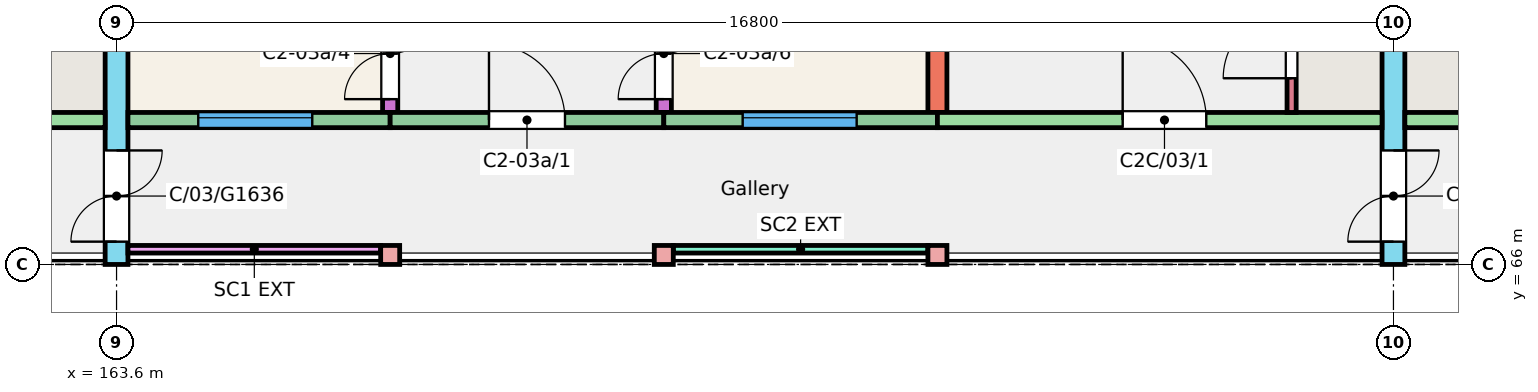
"""IFC4 building model, lengths in metres.
Left out: names, types, materials, properties, quantities, classifications, styles, units other than length and angle.
Written with IfcOpenShell. Run it as: python <this file> out.ifc"""

import sys

from ifc_helpers import new_model, si_unit, direction, frame, frame_2d, origin, origin_2d, place, context, subcontext, project, spatial, rectangle, extrude, element, fill, save


model = new_model("IFC4")
c1 = context("Model", 3, precision=1e-05, world=origin(), true_north=direction((0.0, 1.0)))
c2 = subcontext(c1, "Body", "Model", "MODEL_VIEW")
j1 = project(units=[si_unit("LENGTHUNIT", "METRE"), si_unit("PLANEANGLEUNIT", "RADIAN")], contexts=[c1])
p1 = place(None, origin())
s1 = spatial("IfcSite", under=j1, at=p1, CompositionType="ELEMENT")
p2 = place(p1, origin())
s2 = spatial("IfcBuilding", under=s1, at=p2, CompositionType="ELEMENT")
p3 = place(p2, frame((0.0, 0.0, 9.0)))
s3 = spatial("IfcBuildingStorey", under=s2, at=p3, CompositionType="ELEMENT", Elevation=9.0)
p4 = place(p3, frame((163.6, 66.0, 0.0), z_axis=(0.0, 0.0, 1.0), x_axis=(0.0, 1.0, 0.0)))
e1 = element("IfcWall", 1, at=p4, inside=s3, PredefinedType="SHEAR", context=c2, shape_type="SweptSolid", body=[
    extrude(rectangle(XDim=11.0, YDim=0.3, at=frame_2d((5.5, 0.0))), origin(), (0.0, 0.0, 1.0), 3.0),
])
p5 = place(p4, frame((0.3, 0.0, 0.0)))
e2 = element("IfcOpeningElement", 2, at=p5, cuts=e1, PredefinedType="OPENING", context=c2, shape_type="SweptSolid", body=[
    extrude(rectangle(XDim=1.2, YDim=2.1, at=frame_2d((0.6, 1.05))), frame((0.0, 0.16, 0.0), z_axis=(0.0, -1.0, 0.0), x_axis=(1.0, 0.0, 0.0)), (0.0, 0.0, 1.0), 0.32),
])
p6 = place(p3, frame((167.2, 68.0, 0.0), z_axis=(0.0, 0.0, 1.0), x_axis=(0.0, 1.0, 0.0)))
e3 = element("IfcWall", 3, at=p6, inside=s3, PredefinedType="SHEAR", context=c2, shape_type="SweptSolid", body=[
    extrude(rectangle(XDim=9.0, YDim=0.2, at=frame_2d((4.5, 0.0))), origin(), (0.0, 0.0, 1.0), 3.0),
])
p7 = place(p6, frame((0.175, 0.0, 0.0)))
e4 = element("IfcOpeningElement", 4, at=p7, cuts=e3, PredefinedType="OPENING", context=c2, shape_type="SweptSolid", body=[
    extrude(rectangle(XDim=1.2, YDim=2.1, at=frame_2d((0.6, 1.05))), frame((0.0, 0.11, 0.0), z_axis=(0.0, -1.0, 0.0), x_axis=(1.0, 0.0, 0.0)), (0.0, 0.0, 1.0), 0.22),
])
p8 = place(p6, frame((6.4, 0.0, 0.0)))
e5 = element("IfcOpeningElement", 5, at=p8, cuts=e3, PredefinedType="OPENING", context=c2, shape_type="SweptSolid", body=[
    extrude(rectangle(XDim=1.2, YDim=2.1, at=frame_2d((0.6, 1.05))), frame((0.0, 0.11, 0.0), z_axis=(0.0, -1.0, 0.0), x_axis=(1.0, 0.0, 0.0)), (0.0, 0.0, 1.0), 0.22),
])
p9 = place(p3, frame((170.8, 68.0, 0.0), z_axis=(0.0, 0.0, 1.0), x_axis=(0.0, 1.0, 0.0)))
e6 = element("IfcWall", 6, at=p9, inside=s3, PredefinedType="SHEAR", context=c2, shape_type="SweptSolid", body=[
    extrude(rectangle(XDim=9.0, YDim=0.2, at=frame_2d((4.5, 0.0))), origin(), (0.0, 0.0, 1.0), 3.0),
])
p10 = place(p9, frame((0.175, 0.0, 0.0)))
e7 = element("IfcOpeningElement", 7, at=p10, cuts=e6, PredefinedType="OPENING", context=c2, shape_type="SweptSolid", body=[
    extrude(rectangle(XDim=1.2, YDim=2.1, at=frame_2d((0.6, 1.05))), frame((0.0, 0.11, 0.0), z_axis=(0.0, -1.0, 0.0), x_axis=(1.0, 0.0, 0.0)), (0.0, 0.0, 1.0), 0.22),
])
p11 = place(p9, frame((6.4, 0.0, 0.0)))
e8 = element("IfcOpeningElement", 8, at=p11, cuts=e6, PredefinedType="OPENING", context=c2, shape_type="SweptSolid", body=[
    extrude(rectangle(XDim=1.2, YDim=2.1, at=frame_2d((0.6, 1.05))), frame((0.0, 0.11, 0.0), z_axis=(0.0, -1.0, 0.0), x_axis=(1.0, 0.0, 0.0)), (0.0, 0.0, 1.0), 0.22),
])
p12 = place(p3, frame((174.4, 68.0, 0.0), z_axis=(0.0, 0.0, 1.0), x_axis=(0.0, 1.0, 0.0)))
e9 = element("IfcWall", 9, at=p12, inside=s3, PredefinedType="SHEAR", context=c2, shape_type="SweptSolid", body=[
    extrude(rectangle(XDim=9.0, YDim=0.25, at=frame_2d((4.5, 0.0))), origin(), (0.0, 0.0, 1.0), 3.0),
])
p13 = place(p3, frame((180.4, 66.0, 0.0), z_axis=(0.0, 0.0, 1.0), x_axis=(0.0, 1.0, 0.0)))
e10 = element("IfcWall", 10, at=p13, inside=s3, PredefinedType="SHEAR", context=c2, shape_type="SweptSolid", body=[
    extrude(rectangle(XDim=11.0, YDim=0.3, at=frame_2d((5.5, 0.0))), origin(), (0.0, 0.0, 1.0), 3.0),
])
p14 = place(p13, frame((0.3, 0.0, 0.0)))
e11 = element("IfcOpeningElement", 11, at=p14, cuts=e10, PredefinedType="OPENING", context=c2, shape_type="SweptSolid", body=[
    extrude(rectangle(XDim=1.2, YDim=2.1, at=frame_2d((0.6, 1.05))), frame((0.0, 0.16, 0.0), z_axis=(0.0, -1.0, 0.0), x_axis=(1.0, 0.0, 0.0)), (0.0, 0.0, 1.0), 0.32),
])
p15 = place(p3, frame((157.6, 67.9, 0.0), z_axis=(0.0, 0.0, 1.0), x_axis=(1.0, 0.0, 0.0)))
e12 = element("IfcWall", 12, at=p15, inside=s3, PredefinedType="SHEAR", context=c2, shape_type="SweptSolid", body=[
    extrude(rectangle(XDim=5.85, YDim=0.2, at=frame_2d((2.925, 0.0))), origin(), (0.0, 0.0, 1.0), 3.0),
])
p16 = place(p15, frame((2.438, 0.0, 0.0)))
e13 = element("IfcOpeningElement", 13, at=p16, cuts=e12, PredefinedType="OPENING", context=c2, shape_type="SweptSolid", body=[
    extrude(rectangle(XDim=1.1, YDim=2.1, at=frame_2d((0.55, 1.05))), frame((0.0, 0.11, 0.0), z_axis=(0.0, -1.0, 0.0), x_axis=(1.0, 0.0, 0.0)), (0.0, 0.0, 1.0), 0.22),
])
p17 = place(p3, frame((163.75, 67.9, 0.0), z_axis=(0.0, 0.0, 1.0), x_axis=(1.0, 0.0, 0.0)))
e14 = element("IfcWall", 14, at=p17, inside=s3, PredefinedType="SOLIDWALL", context=c2, shape_type="SweptSolid", body=[
    extrude(rectangle(XDim=3.45, YDim=0.2, at=frame_2d((1.725, 0.0))), origin(), (0.0, 0.0, 1.0), 3.0),
])
p18 = place(p17, frame((0.925, 0.0, 0.9)))
e15 = element("IfcOpeningElement", 15, at=p18, cuts=e14, PredefinedType="OPENING", context=c2, shape_type="SweptSolid", body=[
    extrude(rectangle(XDim=1.5, YDim=1.5, at=frame_2d((0.75, 0.75))), frame((0.0, 0.11, 0.0), z_axis=(0.0, -1.0, 0.0), x_axis=(1.0, 0.0, 0.0)), (0.0, 0.0, 1.0), 0.22),
])
p19 = place(p3, frame((167.2, 67.9, 0.0), z_axis=(0.0, 0.0, 1.0), x_axis=(1.0, 0.0, 0.0)))
e16 = element("IfcWall", 16, at=p19, inside=s3, PredefinedType="SOLIDWALL", context=c2, shape_type="SweptSolid", body=[
    extrude(rectangle(XDim=3.6, YDim=0.2, at=frame_2d((1.8, 0.0))), origin(), (0.0, 0.0, 1.0), 3.0),
])
p20 = place(p19, frame((1.3, 0.0, 0.0)))
e17 = element("IfcOpeningElement", 17, at=p20, cuts=e16, PredefinedType="OPENING", context=c2, shape_type="SweptSolid", body=[
    extrude(rectangle(XDim=1.0, YDim=2.1, at=frame_2d((0.5, 1.05))), frame((0.0, 0.11, 0.0), z_axis=(0.0, -1.0, 0.0), x_axis=(1.0, 0.0, 0.0)), (0.0, 0.0, 1.0), 0.22),
])
p21 = place(p3, frame((170.8, 67.9, 0.0), z_axis=(0.0, 0.0, 1.0), x_axis=(1.0, 0.0, 0.0)))
e18 = element("IfcWall", 18, at=p21, inside=s3, PredefinedType="SOLIDWALL", context=c2, shape_type="SweptSolid", body=[
    extrude(rectangle(XDim=3.6, YDim=0.2, at=frame_2d((1.8, 0.0))), origin(), (0.0, 0.0, 1.0), 3.0),
])
p22 = place(p21, frame((1.038, 0.0, 0.9)))
e19 = element("IfcOpeningElement", 19, at=p22, cuts=e18, PredefinedType="OPENING", context=c2, shape_type="SweptSolid", body=[
    extrude(rectangle(XDim=1.5, YDim=1.5, at=frame_2d((0.75, 0.75))), frame((0.0, 0.11, 0.0), z_axis=(0.0, -1.0, 0.0), x_axis=(1.0, 0.0, 0.0)), (0.0, 0.0, 1.0), 0.22),
])
p23 = place(p3, frame((174.4, 67.9, 0.0), z_axis=(0.0, 0.0, 1.0), x_axis=(1.0, 0.0, 0.0)))
e20 = element("IfcWall", 20, at=p23, inside=s3, PredefinedType="SHEAR", context=c2, shape_type="SweptSolid", body=[
    extrude(rectangle(XDim=5.85, YDim=0.2, at=frame_2d((2.925, 0.0))), origin(), (0.0, 0.0, 1.0), 3.0),
])
p24 = place(p23, frame((2.438, 0.0, 0.0)))
e21 = element("IfcOpeningElement", 21, at=p24, cuts=e20, PredefinedType="OPENING", context=c2, shape_type="SweptSolid", body=[
    extrude(rectangle(XDim=1.1, YDim=2.1, at=frame_2d((0.55, 1.05))), frame((0.0, 0.11, 0.0), z_axis=(0.0, -1.0, 0.0), x_axis=(1.0, 0.0, 0.0)), (0.0, 0.0, 1.0), 0.22),
])
p25 = place(p3, frame((179.06, 68.0, 0.0), z_axis=(0.0, 0.0, 1.0), x_axis=(0.0, 1.0, 0.0)))
e22 = element("IfcWall", 22, at=p25, inside=s3, PredefinedType="SHEAR", context=c2, shape_type="SweptSolid", body=[
    extrude(rectangle(XDim=1.72, YDim=0.12, at=frame_2d((0.86, 0.0))), origin(), (0.0, 0.0, 1.0), 3.0),
])
p26 = place(p25, frame((0.45, 0.0, 0.0)))
e23 = element("IfcOpeningElement", 23, at=p26, cuts=e22, PredefinedType="OPENING", context=c2, shape_type="SweptSolid", body=[
    extrude(rectangle(XDim=0.9, YDim=2.1, at=frame_2d((0.45, 1.05))), frame((0.0, 0.07, 0.0), z_axis=(0.0, -1.0, 0.0), x_axis=(1.0, 0.0, 0.0)), (0.0, 0.0, 1.0), 0.14),
])
p27 = place(p3, frame((180.55, 67.9, 0.0), z_axis=(0.0, 0.0, 1.0), x_axis=(1.0, 0.0, 0.0)))
e24 = element("IfcWall", 24, at=p27, inside=s3, PredefinedType="SHEAR", context=c2, shape_type="SweptSolid", body=[
    extrude(rectangle(XDim=5.85, YDim=0.2, at=frame_2d((2.925, 0.0))), origin(), (0.0, 0.0, 1.0), 3.0),
])
p28 = place(p27, frame((2.312, 0.0, 0.0)))
e25 = element("IfcOpeningElement", 25, at=p28, cuts=e24, PredefinedType="OPENING", context=c2, shape_type="SweptSolid", body=[
    extrude(rectangle(XDim=1.1, YDim=2.1, at=frame_2d((0.55, 1.05))), frame((0.0, 0.11, 0.0), z_axis=(0.0, -1.0, 0.0), x_axis=(1.0, 0.0, 0.0)), (0.0, 0.0, 1.0), 0.22),
])
for number, where, z_axis, x_axis in (
    (26, (167.2, 66.125, 0.0), (0.0, 0.0, 1.0), (1.0, 0.0, 0.0)),
    (27, (170.8, 66.125, 0.0), (0.0, 0.0, 1.0), (1.0, 0.0, 0.0)),
    (28, (174.4, 66.125, 0.0), (0.0, 0.0, 1.0), (1.0, 0.0, 0.0)),
):
    element("IfcColumn", number, at=place(p3, frame(where, z_axis=z_axis, x_axis=x_axis)), inside=s3, PredefinedType="COLUMN", context=c2, shape_type="SweptSolid", body=[
        extrude(rectangle(XDim=0.25, YDim=0.25, at=origin_2d()), origin(), (0.0, 0.0, 1.0), 3.0),
    ])
p29 = place(p3, frame((163.75, 66.2, 0.0), z_axis=(0.0, 0.0, 1.0), x_axis=(1.0, 0.0, 0.0)))
e29 = element("IfcWall", 29, at=p29, inside=s3, PredefinedType="SOLIDWALL", context=c2, shape_type="SweptSolid", body=[
    extrude(rectangle(XDim=3.325, YDim=0.1, at=frame_2d((1.663, 0.0))), origin(), (0.0, 0.0, 1.0), 2.45),
])
p30 = place(p3, frame((170.925, 66.2, 0.0), z_axis=(0.0, 0.0, 1.0), x_axis=(1.0, 0.0, 0.0)))
e30 = element("IfcWall", 30, at=p30, inside=s3, PredefinedType="SOLIDWALL", context=c2, shape_type="SweptSolid", body=[
    extrude(rectangle(XDim=3.35, YDim=0.1, at=frame_2d((1.675, 0.0))), origin(), (0.0, 0.0, 1.0), 2.45),
])
p31 = place(p18, origin())
e31 = element("IfcWindow", 31, at=p31, inside=s3, PartitioningType="SINGLE_PANEL", PredefinedType="WINDOW", context=c2, shape_type="SweptSolid", body=[
    extrude(rectangle(XDim=1.5, YDim=1.5, at=frame_2d((0.75, 0.75))), frame((0.0, 0.06, 0.0), z_axis=(0.0, -1.0, 0.0), x_axis=(1.0, 0.0, 0.0)), (0.0, 0.0, 1.0), 0.06),
])
fill(e15, e31)
p32 = place(p22, origin())
e32 = element("IfcWindow", 32, at=p32, inside=s3, PartitioningType="SINGLE_PANEL", PredefinedType="WINDOW", context=c2, shape_type="SweptSolid", body=[
    extrude(rectangle(XDim=1.5, YDim=1.5, at=frame_2d((0.75, 0.75))), frame((0.0, 0.06, 0.0), z_axis=(0.0, -1.0, 0.0), x_axis=(1.0, 0.0, 0.0)), (0.0, 0.0, 1.0), 0.06),
])
fill(e19, e32)
p33 = place(p20, origin())
e33 = element("IfcDoor", 33, at=p33, inside=s3, OperationType="SINGLE_SWING_LEFT", PredefinedType="DOOR", context=c2, shape_type="SweptSolid", body=[
    extrude(rectangle(XDim=1.0, YDim=2.1, at=frame_2d((0.5, 1.05))), frame((0.0, 0.025, 0.0), z_axis=(0.0, -1.0, 0.0), x_axis=(1.0, 0.0, 0.0)), (0.0, 0.0, 1.0), 0.05),
])
fill(e17, e33)
p34 = place(p7, origin())
e34 = element("IfcDoor", 34, at=p34, inside=s3, OperationType="DOUBLE_DOOR_SINGLE_SWING", PredefinedType="DOOR", context=c2, shape_type="SweptSolid", body=[
    extrude(rectangle(XDim=1.2, YDim=2.1, at=frame_2d((0.6, 1.05))), frame((0.0, 0.025, 0.0), z_axis=(0.0, -1.0, 0.0), x_axis=(1.0, 0.0, 0.0)), (0.0, 0.0, 1.0), 0.05),
])
fill(e4, e34)
p35 = place(p10, origin())
e35 = element("IfcDoor", 35, at=p35, inside=s3, OperationType="DOUBLE_DOOR_SINGLE_SWING", PredefinedType="DOOR", context=c2, shape_type="SweptSolid", body=[
    extrude(rectangle(XDim=1.2, YDim=2.1, at=frame_2d((0.6, 1.05))), frame((0.0, 0.025, 0.0), z_axis=(0.0, -1.0, 0.0), x_axis=(1.0, 0.0, 0.0)), (0.0, 0.0, 1.0), 0.05),
])
fill(e7, e35)
p36 = place(p24, origin())
e36 = element("IfcDoor", 36, at=p36, inside=s3, OperationType="SINGLE_SWING_LEFT", PredefinedType="DOOR", context=c2, shape_type="SweptSolid", body=[
    extrude(rectangle(XDim=1.1, YDim=2.1, at=frame_2d((0.55, 1.05))), frame((0.0, 0.025, 0.0), z_axis=(0.0, -1.0, 0.0), x_axis=(1.0, 0.0, 0.0)), (0.0, 0.0, 1.0), 0.05),
])
fill(e21, e36)
p37 = place(p26, origin())
e37 = element("IfcDoor", 37, at=p37, inside=s3, OperationType="SINGLE_SWING_LEFT", PredefinedType="DOOR", context=c2, shape_type="SweptSolid", body=[
    extrude(rectangle(XDim=0.9, YDim=2.1, at=frame_2d((0.45, 1.05))), frame((0.0, 0.025, 0.0), z_axis=(0.0, -1.0, 0.0), x_axis=(1.0, 0.0, 0.0)), (0.0, 0.0, 1.0), 0.05),
])
fill(e23, e37)
p38 = place(p5, origin())
e38 = element("IfcDoor", 38, at=p38, inside=s3, OperationType="DOUBLE_DOOR_SINGLE_SWING", PredefinedType="DOOR", context=c2, shape_type="SweptSolid", body=[
    extrude(rectangle(XDim=1.2, YDim=2.1, at=frame_2d((0.6, 1.05))), frame((0.0, 0.025, 0.0), z_axis=(0.0, -1.0, 0.0), x_axis=(1.0, 0.0, 0.0)), (0.0, 0.0, 1.0), 0.05),
])
fill(e2, e38)
p39 = place(p14, origin())
e39 = element("IfcDoor", 39, at=p39, inside=s3, OperationType="DOUBLE_DOOR_SINGLE_SWING", PredefinedType="DOOR", context=c2, shape_type="SweptSolid", body=[
    extrude(rectangle(XDim=1.2, YDim=2.1, at=frame_2d((0.6, 1.05))), frame((0.0, 0.025, 0.0), z_axis=(0.0, -1.0, 0.0), x_axis=(1.0, 0.0, 0.0)), (0.0, 0.0, 1.0), 0.05),
])
fill(e11, e39)
save(model, sys.argv[1])
